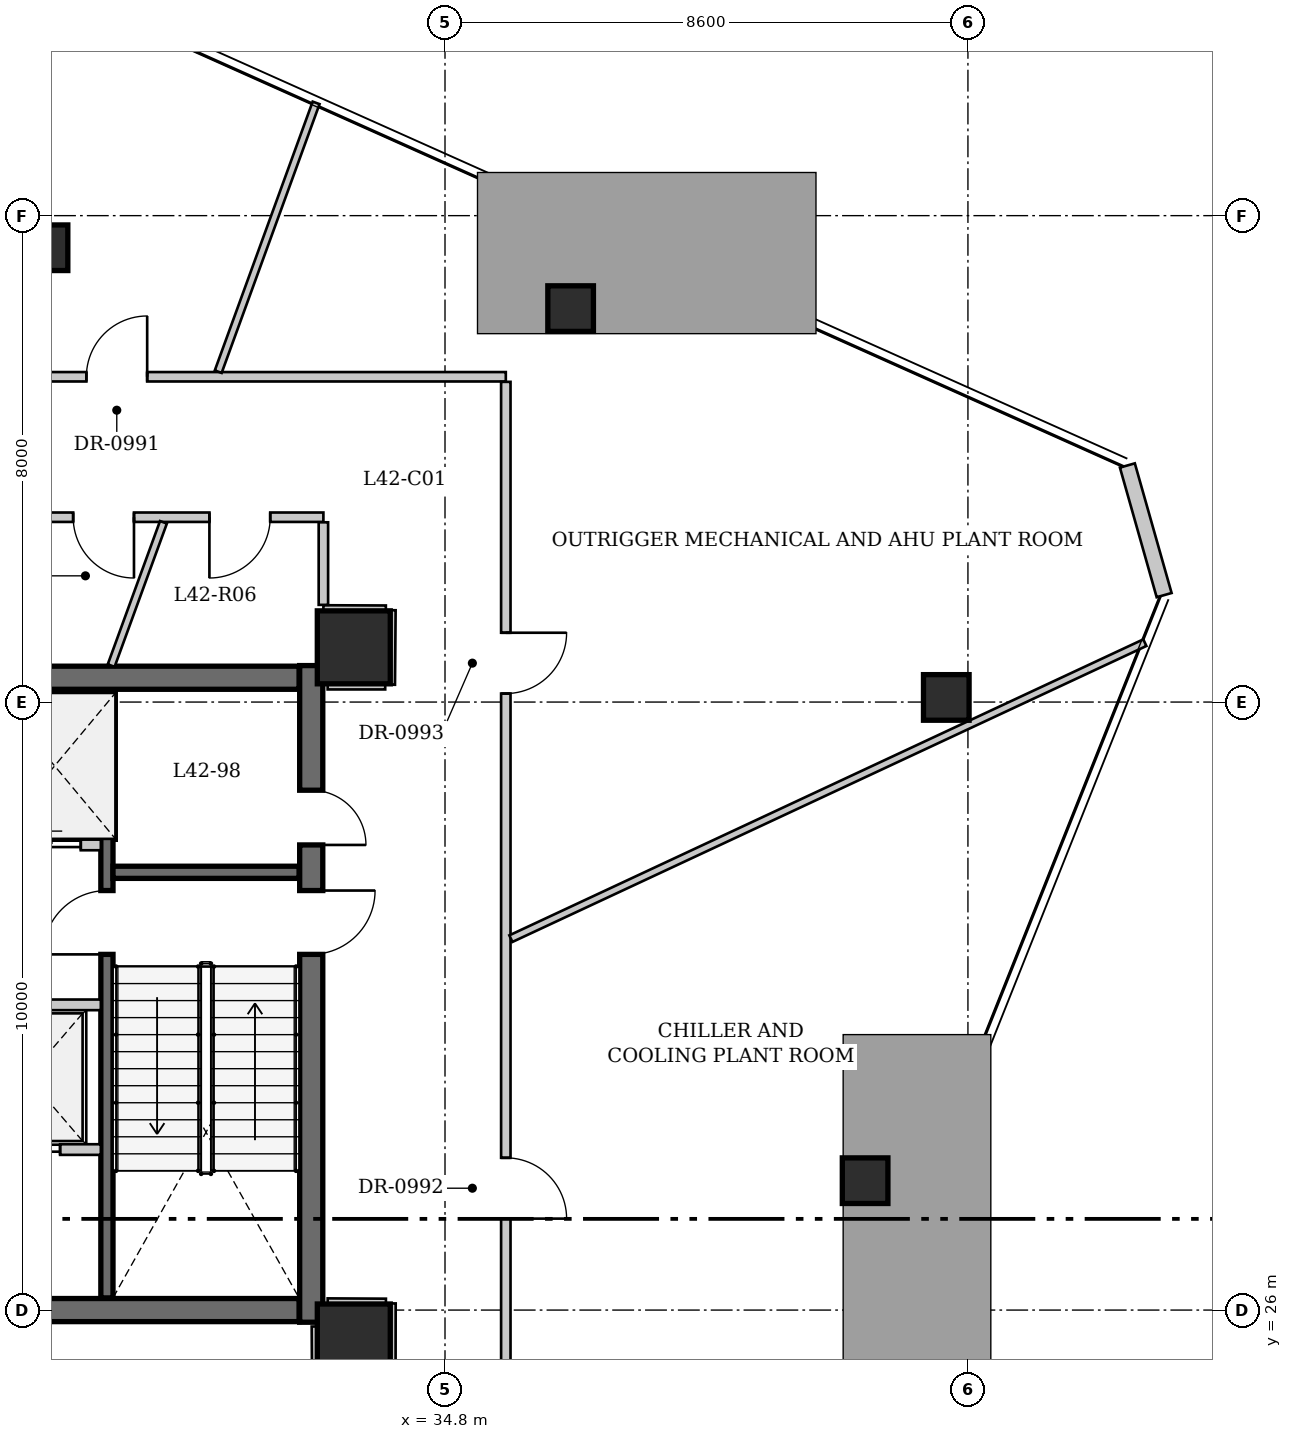
"""IFC4 building model, lengths in metres.
Left out: names, types, materials, properties, quantities, classifications, styles, units other than length and angle.
Written with IfcOpenShell. Run it as: python <this file> out.ifc"""

import sys

from ifc_helpers import new_model, si_unit, direction, frame, frame_2d, origin, origin_2d, place, context, subcontext, project, spatial, rectangle, hollow_rectangle, extrude, source, transform, mapped, element, fill, save


model = new_model("IFC4")
c1 = context("Model", 3, precision=1e-05, world=origin(), true_north=direction((0.0, 1.0)))
c2 = subcontext(c1, "Body", "Model", "MODEL_VIEW")
j1 = project(units=[si_unit("LENGTHUNIT", "METRE"), si_unit("PLANEANGLEUNIT", "RADIAN")], contexts=[c1])
p1 = place(None, origin())
s1 = spatial("IfcSite", under=j1, at=p1, CompositionType="ELEMENT")
p2 = place(p1, origin())
s2 = spatial("IfcBuilding", under=s1, at=p2, CompositionType="ELEMENT")
p3 = place(p2, frame((0.0, 0.0, 162.4)))
s3 = spatial("IfcBuildingStorey", under=s2, at=p3, CompositionType="ELEMENT", Elevation=162.4)
for number, where, z_axis, x_axis in (
    (1, (36.866, 42.471, 0.0), (0.0, 0.0, 1.0), (1.0, 0.0, 0.0)),
    (2, (43.044, 36.076, 0.0), (0.0, 0.0, 1.0), (1.0, 0.0, 0.0)),
    (3, (41.709, 28.128, 0.0), (0.0, 0.0, 1.0), (1.0, 0.0, 0.0)),
    (4, (28.222, 43.472, 0.0), (0.0, 0.0, 1.0), (1.0, 0.0, 0.0)),
):
    element("IfcColumn", number, at=place(p3, frame(where, z_axis=z_axis, x_axis=x_axis)), inside=s3, PredefinedType="COLUMN", context=c2, shape_type="SweptSolid", body=[
        extrude(hollow_rectangle(XDim=0.75, YDim=0.75, WallThickness=0.04, at=origin_2d()), origin(), (0.0, 0.0, 1.0), 4.15),
    ])
for number, where, z_axis, x_axis in (
    (5, (33.3, 25.5, 0.0), (0.0, 0.0, 1.0), (1.0, 0.0, 0.0)),
    (6, (33.3, 36.9, 0.0), (0.0, 0.0, 1.0), (1.0, 0.0, 0.0)),
):
    element("IfcColumn", number, at=place(p3, frame(where, z_axis=z_axis, x_axis=x_axis)), inside=s3, PredefinedType="COLUMN", context=c2, shape_type="SweptSolid", body=[
        extrude(rectangle(XDim=1.2, YDim=1.2, at=origin_2d()), origin(), (0.0, 0.0, 1.0), 4.15),
    ])
p4 = place(p3, frame((46.022, 39.891, 0.0), z_axis=(0.0, 0.0, 1.0), x_axis=(0.272713024776, -0.962095424642, 0.0)))
e7 = element("IfcWall", 7, at=p4, inside=s3, PredefinedType="SOLIDWALL", context=c2, shape_type="SweptSolid", body=[
    extrude(rectangle(XDim=2.217, YDim=0.255, at=frame_2d((1.108, 0.0))), origin(), (0.0, 0.0, 1.0), 4.15),
])
p5 = place(p3, frame((32.6, 36.6, 0.0), z_axis=(0.0, 0.0, 1.0), x_axis=(0.0, -1.0, 0.0)))
e8 = element("IfcWall", 8, at=p5, inside=s3, PredefinedType="SHEAR", context=c2, shape_type="SweptSolid", body=[
    extrude(rectangle(XDim=10.8, YDim=0.38, at=frame_2d((5.4, 0.0))), origin(), (0.0, 0.0, 1.0), 4.6),
])
p6 = place(p5, frame((3.7, 0.0, 0.0)))
e9 = element("IfcOpeningElement", 9, at=p6, cuts=e8, PredefinedType="OPENING", context=c2, shape_type="SweptSolid", body=[
    extrude(rectangle(XDim=1.05, YDim=2.15, at=frame_2d((0.525, 1.075))), frame((0.0, 0.2, 0.0), z_axis=(0.0, -1.0, 0.0), x_axis=(1.0, 0.0, 0.0)), (0.0, 0.0, 1.0), 0.4),
])
p7 = place(p5, frame((2.05, 0.0, 0.0)))
e10 = element("IfcOpeningElement", 10, at=p7, cuts=e8, PredefinedType="OPENING", context=c2, shape_type="SweptSolid", body=[
    extrude(rectangle(XDim=0.9, YDim=2.1, at=frame_2d((0.45, 1.05))), frame((0.0, 0.2, 0.0), z_axis=(0.0, -1.0, 0.0), x_axis=(1.0, 0.0, 0.0)), (0.0, 0.0, 1.0), 0.4),
])
p8 = place(p3, frame((19.6, 36.4, 0.0), z_axis=(0.0, 0.0, 1.0), x_axis=(1.0, 0.0, 0.0)))
e11 = element("IfcWall", 11, at=p8, inside=s3, PredefinedType="SHEAR", context=c2, shape_type="SweptSolid", body=[
    extrude(rectangle(XDim=12.8, YDim=0.38, at=frame_2d((6.4, 0.0))), origin(), (0.0, 0.0, 1.0), 4.6),
])
p9 = place(p3, frame((32.4, 26.0, 0.0), z_axis=(0.0, 0.0, 1.0), x_axis=(-1.0, 0.0, 0.0)))
e12 = element("IfcWall", 12, at=p9, inside=s3, PredefinedType="SHEAR", context=c2, shape_type="SweptSolid", body=[
    extrude(rectangle(XDim=12.8, YDim=0.38, at=frame_2d((6.4, 0.0))), origin(), (0.0, 0.0, 1.0), 4.6),
])
p10 = place(p9, frame((10.75, 0.0, 0.0)))
e13 = element("IfcOpeningElement", 13, at=p10, cuts=e12, PredefinedType="OPENING", context=c2, shape_type="SweptSolid", body=[
    extrude(rectangle(XDim=1.05, YDim=2.15, at=frame_2d((0.525, 1.075))), frame((0.0, 0.2, 0.0), z_axis=(0.0, -1.0, 0.0), x_axis=(1.0, 0.0, 0.0)), (0.0, 0.0, 1.0), 0.4),
])
p11 = place(p9, frame((5.67, 0.0, 0.0)))
e14 = element("IfcOpeningElement", 14, at=p11, cuts=e12, PredefinedType="OPENING", context=c2, shape_type="SweptSolid", body=[
    extrude(rectangle(XDim=1.45, YDim=2.2, at=frame_2d((0.725, 1.1))), frame((0.0, 0.2, 0.0), z_axis=(0.0, -1.0, 0.0), x_axis=(1.0, 0.0, 0.0)), (0.0, 0.0, 1.0), 0.4),
])
p12 = place(p3, frame((29.24, 26.2, 0.0), z_axis=(0.0, 0.0, 1.0), x_axis=(0.0, 1.0, 0.0)))
e15 = element("IfcWall", 15, at=p12, inside=s3, PredefinedType="SHEAR", context=c2, shape_type="SweptSolid", body=[
    extrude(rectangle(XDim=10.0, YDim=0.2, at=frame_2d((5.0, 0.0))), origin(), (0.0, 0.0, 1.0), 4.6),
])
p13 = place(p12, frame((5.65, 0.0, 0.0)))
e16 = element("IfcOpeningElement", 16, at=p13, cuts=e15, PredefinedType="OPENING", context=c2, shape_type="SweptSolid", body=[
    extrude(rectangle(XDim=1.05, YDim=2.15, at=frame_2d((0.525, 1.075))), frame((0.0, 0.11, 0.0), z_axis=(0.0, -1.0, 0.0), x_axis=(1.0, 0.0, 0.0)), (0.0, 0.0, 1.0), 0.22),
])
p14 = place(p3, frame((29.34, 33.2, 0.0), z_axis=(0.0, 0.0, 1.0), x_axis=(1.0, 0.0, 0.0)))
e17 = element("IfcWall", 17, at=p14, inside=s3, PredefinedType="SHEAR", context=c2, shape_type="SweptSolid", body=[
    extrude(rectangle(XDim=3.06, YDim=0.2, at=frame_2d((1.53, 0.0))), origin(), (0.0, 0.0, 1.0), 4.6),
])
p15 = place(p3, frame((22.86, 33.65, 0.0), z_axis=(0.0, 0.0, 1.0), x_axis=(1.0, 0.0, 0.0)))
e18 = element("IfcWall", 18, at=p15, inside=s3, PredefinedType="SOLIDWALL", context=c2, shape_type="SweptSolid", body=[
    extrude(rectangle(XDim=6.28, YDim=0.175, at=frame_2d((3.14, 0.0))), origin(), (0.0, 0.0, 1.0), 4.15),
])
p16 = place(p15, frame((0.5, 0.0, 0.0)))
e19 = element("IfcOpeningElement", 19, at=p16, cuts=e18, PredefinedType="OPENING", context=c2, shape_type="SweptSolid", body=[
    extrude(rectangle(XDim=1.05, YDim=2.15, at=frame_2d((0.525, 1.075))), frame((0.0, 0.098, 0.0), z_axis=(0.0, -1.0, 0.0), x_axis=(1.0, 0.0, 0.0)), (0.0, 0.0, 1.0), 0.195),
])
p17 = place(p15, frame((2.76, 0.0, 0.0)))
e20 = element("IfcOpeningElement", 20, at=p17, cuts=e18, PredefinedType="OPENING", context=c2, shape_type="SweptSolid", body=[
    extrude(rectangle(XDim=1.05, YDim=2.15, at=frame_2d((0.525, 1.075))), frame((0.0, 0.098, 0.0), z_axis=(0.0, -1.0, 0.0), x_axis=(1.0, 0.0, 0.0)), (0.0, 0.0, 1.0), 0.195),
])
p18 = place(p15, frame((4.9, 0.0, 0.0)))
e21 = element("IfcOpeningElement", 21, at=p18, cuts=e18, PredefinedType="OPENING", context=c2, shape_type="SweptSolid", body=[
    extrude(rectangle(XDim=1.05, YDim=2.15, at=frame_2d((0.525, 1.075))), frame((0.0, 0.098, 0.0), z_axis=(0.0, -1.0, 0.0), x_axis=(1.0, 0.0, 0.0)), (0.0, 0.0, 1.0), 0.195),
])
p19 = place(p3, frame((22.86, 31.02, 0.0), z_axis=(0.0, 0.0, 1.0), x_axis=(1.0, 0.0, 0.0)))
e22 = element("IfcWall", 22, at=p19, inside=s3, PredefinedType="SOLIDWALL", context=c2, shape_type="SweptSolid", body=[
    extrude(rectangle(XDim=6.28, YDim=0.175, at=frame_2d((3.14, 0.0))), origin(), (0.0, 0.0, 1.0), 4.15),
])
p20 = place(p3, frame((22.86, 28.64, 0.0), z_axis=(0.0, 0.0, 1.0), x_axis=(1.0, 0.0, 0.0)))
e23 = element("IfcWall", 23, at=p20, inside=s3, PredefinedType="SOLIDWALL", context=c2, shape_type="SweptSolid", body=[
    extrude(rectangle(XDim=6.28, YDim=0.175, at=frame_2d((3.14, 0.0))), origin(), (0.0, 0.0, 1.0), 4.15),
])
p21 = place(p20, frame((0.66, 0.0, 0.0)))
e24 = element("IfcOpeningElement", 24, at=p21, cuts=e23, PredefinedType="OPENING", context=c2, shape_type="SweptSolid", body=[
    extrude(rectangle(XDim=1.05, YDim=2.15, at=frame_2d((0.525, 1.075))), frame((0.0, 0.098, 0.0), z_axis=(0.0, -1.0, 0.0), x_axis=(1.0, 0.0, 0.0)), (0.0, 0.0, 1.0), 0.195),
])
p22 = place(p20, frame((2.62, 0.0, 0.0)))
e25 = element("IfcOpeningElement", 25, at=p22, cuts=e23, PredefinedType="OPENING", context=c2, shape_type="SweptSolid", body=[
    extrude(rectangle(XDim=1.05, YDim=2.15, at=frame_2d((0.525, 1.075))), frame((0.0, 0.098, 0.0), z_axis=(0.0, -1.0, 0.0), x_axis=(1.0, 0.0, 0.0)), (0.0, 0.0, 1.0), 0.195),
])
p23 = place(p20, frame((4.56, 0.0, 0.0)))
e26 = element("IfcOpeningElement", 26, at=p23, cuts=e23, PredefinedType="OPENING", context=c2, shape_type="SweptSolid", body=[
    extrude(rectangle(XDim=1.05, YDim=2.15, at=frame_2d((0.525, 1.075))), frame((0.0, 0.098, 0.0), z_axis=(0.0, -1.0, 0.0), x_axis=(1.0, 0.0, 0.0)), (0.0, 0.0, 1.0), 0.195),
])
p24 = place(p3, frame((15.339, 41.35, 0.0), z_axis=(0.0, 0.0, 1.0), x_axis=(1.0, 0.0, 0.0)))
e27 = element("IfcWall", 27, at=p24, inside=s3, PredefinedType="PARTITIONING", context=c2, shape_type="SweptSolid", body=[
    extrude(rectangle(XDim=20.461, YDim=0.155, at=frame_2d((10.23, 0.0))), origin(), (0.0, 0.0, 1.0), 4.15),
])
p25 = place(p24, frame((13.563, 0.0, 0.0)))
e28 = element("IfcOpeningElement", 28, at=p25, cuts=e27, PredefinedType="OPENING", context=c2, shape_type="SweptSolid", body=[
    extrude(rectangle(XDim=1.0, YDim=2.15, at=frame_2d((0.5, 1.075))), frame((0.0, 0.087, 0.0), z_axis=(0.0, -1.0, 0.0), x_axis=(1.0, 0.0, 0.0)), (0.0, 0.0, 1.0), 0.175),
])
p26 = place(p3, frame((35.8, 41.267, 0.0), z_axis=(0.0, 0.0, 1.0), x_axis=(0.0, -1.0, 0.0)))
e29 = element("IfcWall", 29, at=p26, inside=s3, PredefinedType="PARTITIONING", context=c2, shape_type="SweptSolid", body=[
    extrude(rectangle(XDim=18.267, YDim=0.155, at=frame_2d((9.133, 0.0))), origin(), (0.0, 0.0, 1.0), 4.15),
])
p27 = place(p26, frame((12.762, 0.0, 0.0)))
e30 = element("IfcOpeningElement", 30, at=p27, cuts=e29, PredefinedType="OPENING", context=c2, shape_type="SweptSolid", body=[
    extrude(rectangle(XDim=1.0, YDim=2.15, at=frame_2d((0.5, 1.075))), frame((0.0, 0.087, 0.0), z_axis=(0.0, -1.0, 0.0), x_axis=(1.0, 0.0, 0.0)), (0.0, 0.0, 1.0), 0.175),
])
p28 = place(p26, frame((4.126, 0.0, 0.0)))
e31 = element("IfcOpeningElement", 31, at=p28, cuts=e29, PredefinedType="OPENING", context=c2, shape_type="SweptSolid", body=[
    extrude(rectangle(XDim=1.0, YDim=2.15, at=frame_2d((0.5, 1.075))), frame((0.0, 0.087, 0.0), z_axis=(0.0, -1.0, 0.0), x_axis=(1.0, 0.0, 0.0)), (0.0, 0.0, 1.0), 0.175),
])
p29 = place(p3, frame((32.8, 39.04, 0.0), z_axis=(0.0, 0.0, 1.0), x_axis=(-1.0, 0.0, 0.0)))
e32 = element("IfcWall", 32, at=p29, inside=s3, PredefinedType="PARTITIONING", context=c2, shape_type="SweptSolid", body=[
    extrude(rectangle(XDim=4.77, YDim=0.155, at=frame_2d((2.385, 0.0))), origin(), (0.0, 0.0, 1.0), 4.15),
])
p30 = place(p29, frame((0.875, 0.0, 0.0)))
e33 = element("IfcOpeningElement", 33, at=p30, cuts=e32, PredefinedType="OPENING", context=c2, shape_type="SweptSolid", body=[
    extrude(rectangle(XDim=1.0, YDim=2.15, at=frame_2d((0.5, 1.075))), frame((0.0, 0.087, 0.0), z_axis=(0.0, -1.0, 0.0), x_axis=(1.0, 0.0, 0.0)), (0.0, 0.0, 1.0), 0.175),
])
p31 = place(p29, frame((3.115, 0.0, 0.0)))
e34 = element("IfcOpeningElement", 34, at=p31, cuts=e32, PredefinedType="OPENING", context=c2, shape_type="SweptSolid", body=[
    extrude(rectangle(XDim=1.0, YDim=2.15, at=frame_2d((0.5, 1.075))), frame((0.0, 0.087, 0.0), z_axis=(0.0, -1.0, 0.0), x_axis=(1.0, 0.0, 0.0)), (0.0, 0.0, 1.0), 0.175),
])
p32 = place(p3, frame((33.9, 36.285, 0.0), z_axis=(0.0, 0.0, 1.0), x_axis=(0.008764603579, 0.999961590124, 0.0)))
e35 = element("IfcWall", 35, at=p32, inside=s3, PredefinedType="PARTITIONING", context=c2, shape_type="SweptSolid", body=[
    extrude(rectangle(XDim=1.226, YDim=0.155, at=frame_2d((0.613, 0.0))), origin(), (0.0, 0.0, 1.0), 4.15),
])
p33 = place(p3, frame((33.827, 37.511, 0.0), z_axis=(0.0, 0.0, 1.0), x_axis=(-0.99999276797, 0.003803157663, 0.0)))
e36 = element("IfcWall", 36, at=p33, inside=s3, PredefinedType="PARTITIONING", context=c2, shape_type="SweptSolid", body=[
    extrude(rectangle(XDim=1.027, YDim=0.155, at=frame_2d((0.514, 0.0))), origin(), (0.0, 0.0, 1.0), 2.725),
])
p34 = place(p3, frame((32.8, 37.598, 0.0), z_axis=(0.0, 0.0, 1.0), x_axis=(0.0, 1.0, 0.0)))
e37 = element("IfcWall", 37, at=p34, inside=s3, PredefinedType="PARTITIONING", context=c2, shape_type="SweptSolid", body=[
    extrude(rectangle(XDim=1.358, YDim=0.155, at=frame_2d((0.679, 0.0))), origin(), (0.0, 0.0, 1.0), 4.15),
])
p35 = place(p3, frame((32.685, 25.73, 0.0), z_axis=(0.0, 0.0, 1.0), x_axis=(0.006382231486, -0.999979633353, 0.0)))
e38 = element("IfcWall", 38, at=p35, inside=s3, PredefinedType="PARTITIONING", context=c2, shape_type="SweptSolid", body=[
    extrude(rectangle(XDim=0.842, YDim=0.155, at=frame_2d((0.421, 0.0))), origin(), (0.0, 0.0, 1.0), 2.725),
])
p36 = place(p3, frame((33.91, 24.972, 0.0), z_axis=(0.0, 0.0, 1.0), x_axis=(0.001716735668, 0.999998526408, 0.0)))
e39 = element("IfcWall", 39, at=p36, inside=s3, PredefinedType="PARTITIONING", context=c2, shape_type="SweptSolid", body=[
    extrude(rectangle(XDim=1.138, YDim=0.155, at=frame_2d((0.569, 0.0))), origin(), (0.0, 0.0, 1.0), 2.725),
])
p37 = place(p3, frame((33.828, 26.11, 0.0), z_axis=(0.0, 0.0, 1.0), x_axis=(-0.999987011364, 0.005096773758, 0.0)))
e40 = element("IfcWall", 40, at=p37, inside=s3, PredefinedType="PARTITIONING", context=c2, shape_type="SweptSolid", body=[
    extrude(rectangle(XDim=0.958, YDim=0.155, at=frame_2d((0.479, 0.0))), origin(), (0.0, 0.0, 1.0), 2.725),
])
p38 = place(p3, frame((32.87, 36.285, 0.0), z_axis=(0.0, 0.0, 1.0), x_axis=(1.0, 0.0, 0.0)))
e41 = element("IfcWall", 41, at=p38, inside=s3, PredefinedType="PARTITIONING", context=c2, shape_type="SweptSolid", body=[
    extrude(rectangle(XDim=0.946, YDim=0.155, at=frame_2d((0.473, 0.0))), origin(), (0.0, 0.0, 1.0), 2.725),
])
p39 = place(p3, frame((35.884, 32.109, 0.0), z_axis=(0.0, 0.0, 1.0), x_axis=(0.906109947942, 0.42304227004, 0.0)))
e42 = element("IfcWall", 42, at=p39, inside=s3, PredefinedType="PARTITIONING", context=c2, shape_type="SweptSolid", body=[
    extrude(rectangle(XDim=11.506, YDim=0.12, at=frame_2d((5.753, 0.0))), origin(), (0.0, 0.0, 1.0), 2.725),
])
p40 = place(p3, frame((31.07, 41.434, 0.0), z_axis=(0.0, 0.0, 1.0), x_axis=(0.342105504572, 0.939661547442, 0.0)))
e43 = element("IfcWall", 43, at=p40, inside=s3, PredefinedType="PARTITIONING", context=c2, shape_type="SweptSolid", body=[
    extrude(rectangle(XDim=4.705, YDim=0.12, at=frame_2d((2.353, 0.0))), origin(), (0.0, 0.0, 1.0), 4.15),
])
p41 = place(p3, frame((29.31, 36.6, 0.0), z_axis=(0.0, 0.0, 1.0), x_axis=(0.342618216876, 0.939474724229, 0.0)))
e44 = element("IfcWall", 44, at=p41, inside=s3, PredefinedType="PARTITIONING", context=c2, shape_type="SweptSolid", body=[
    extrude(rectangle(XDim=2.508, YDim=0.12, at=frame_2d((1.254, 0.0))), origin(), (0.0, 0.0, 1.0), 4.15),
])
m1 = source(origin(), c2, "Body", "SweptSolid", [
    extrude(rectangle(XDim=1.05, YDim=2.15, at=frame_2d((0.525, 1.075))), frame((0.0, 0.025, 0.0), z_axis=(0.0, -1.0, 0.0), x_axis=(1.0, 0.0, 0.0)), (0.0, 0.0, 1.0), 0.05),
])
p42 = place(p6, origin())
e45 = element("IfcDoor", 45, at=p42, inside=s3, OperationType="SINGLE_SWING_LEFT", PredefinedType="DOOR", context=c2, shape_type="MappedRepresentation", body=[
    mapped(m1, transform((0.0, 0.0, 0.0), x_axis=(1.0, 0.0, 0.0), y_axis=(0.0, 1.0, 0.0), z_axis=(0.0, 0.0, 1.0), scale=1.0)),
])
fill(e9, e45)
p43 = place(p13, origin())
e46 = element("IfcDoor", 46, at=p43, inside=s3, OperationType="SINGLE_SWING_LEFT", PredefinedType="DOOR", context=c2, shape_type="MappedRepresentation", body=[
    mapped(m1, transform((0.0, 0.0, 0.0), x_axis=(1.0, 0.0, 0.0), y_axis=(0.0, 1.0, 0.0), z_axis=(0.0, 0.0, 1.0), scale=1.0)),
])
fill(e16, e46)
m2 = source(origin(), c2, "Body", "SweptSolid", [
    extrude(rectangle(XDim=1.05, YDim=2.15, at=frame_2d((0.525, 1.075))), frame((0.0, 0.025, 0.0), z_axis=(0.0, -1.0, 0.0), x_axis=(1.0, 0.0, 0.0)), (0.0, 0.0, 1.0), 0.05),
])
p44 = place(p18, origin())
e47 = element("IfcDoor", 47, at=p44, inside=s3, OperationType="SLIDING_TO_LEFT", PredefinedType="DOOR", context=c2, shape_type="MappedRepresentation", body=[
    mapped(m2, transform((0.0, 0.0, 0.0), x_axis=(1.0, 0.0, 0.0), y_axis=(0.0, 1.0, 0.0), z_axis=(0.0, 0.0, 1.0), scale=1.0)),
])
fill(e21, e47)
p45 = place(p23, origin())
e48 = element("IfcDoor", 48, at=p45, inside=s3, OperationType="SLIDING_TO_LEFT", PredefinedType="DOOR", context=c2, shape_type="MappedRepresentation", body=[
    mapped(m2, transform((0.0, 0.0, 0.0), x_axis=(1.0, 0.0, 0.0), y_axis=(0.0, 1.0, 0.0), z_axis=(0.0, 0.0, 1.0), scale=1.0)),
])
fill(e26, e48)
m3 = source(origin(), c2, "Body", "SweptSolid", [
    extrude(rectangle(XDim=0.9, YDim=2.1, at=frame_2d((0.45, 1.05))), frame((0.0, 0.025, 0.0), z_axis=(0.0, -1.0, 0.0), x_axis=(1.0, 0.0, 0.0)), (0.0, 0.0, 1.0), 0.05),
])
p46 = place(p7, origin())
e49 = element("IfcDoor", 49, at=p46, inside=s3, OperationType="SINGLE_SWING_RIGHT", PredefinedType="DOOR", context=c2, shape_type="MappedRepresentation", body=[
    mapped(m3, transform((0.0, 0.0, 0.0), x_axis=(1.0, 0.0, 0.0), y_axis=(0.0, 1.0, 0.0), z_axis=(0.0, 0.0, 1.0), scale=1.0)),
])
fill(e10, e49)
m4 = source(origin(), c2, "Body", "SweptSolid", [
    extrude(rectangle(XDim=1.0, YDim=2.15, at=frame_2d((0.5, 1.075))), frame((0.0, 0.025, 0.0), z_axis=(0.0, -1.0, 0.0), x_axis=(1.0, 0.0, 0.0)), (0.0, 0.0, 1.0), 0.05),
])
p47 = place(p25, origin())
e50 = element("IfcDoor", 50, at=p47, inside=s3, OperationType="SINGLE_SWING_RIGHT", PredefinedType="DOOR", context=c2, shape_type="MappedRepresentation", body=[
    mapped(m4, transform((0.0, 0.0, 0.0), x_axis=(1.0, 0.0, 0.0), y_axis=(0.0, 1.0, 0.0), z_axis=(0.0, 0.0, 1.0), scale=1.0)),
])
fill(e28, e50)
p48 = place(p27, origin())
e51 = element("IfcDoor", 51, at=p48, inside=s3, OperationType="SINGLE_SWING_RIGHT", PredefinedType="DOOR", context=c2, shape_type="MappedRepresentation", body=[
    mapped(m4, transform((0.0, 0.0, 0.0), x_axis=(1.0, 0.0, 0.0), y_axis=(0.0, 1.0, 0.0), z_axis=(0.0, 0.0, 1.0), scale=1.0)),
])
fill(e30, e51)
p49 = place(p28, origin())
e52 = element("IfcDoor", 52, at=p49, inside=s3, OperationType="SINGLE_SWING_LEFT", PredefinedType="DOOR", context=c2, shape_type="MappedRepresentation", body=[
    mapped(m4, transform((0.0, 0.0, 0.0), x_axis=(1.0, 0.0, 0.0), y_axis=(0.0, 1.0, 0.0), z_axis=(0.0, 0.0, 1.0), scale=1.0)),
])
fill(e31, e52)
p50 = place(p30, origin())
e53 = element("IfcDoor", 53, at=p50, inside=s3, OperationType="SINGLE_SWING_RIGHT", PredefinedType="DOOR", context=c2, shape_type="MappedRepresentation", body=[
    mapped(m4, transform((0.0, 0.0, 0.0), x_axis=(1.0, 0.0, 0.0), y_axis=(0.0, 1.0, 0.0), z_axis=(0.0, 0.0, 1.0), scale=1.0)),
])
fill(e33, e53)
p51 = place(p31, origin())
e54 = element("IfcDoor", 54, at=p51, inside=s3, OperationType="SINGLE_SWING_LEFT", PredefinedType="DOOR", context=c2, shape_type="MappedRepresentation", body=[
    mapped(m4, transform((0.0, 0.0, 0.0), x_axis=(1.0, 0.0, 0.0), y_axis=(0.0, 1.0, 0.0), z_axis=(0.0, 0.0, 1.0), scale=1.0)),
])
fill(e34, e54)
save(model, sys.argv[1])
